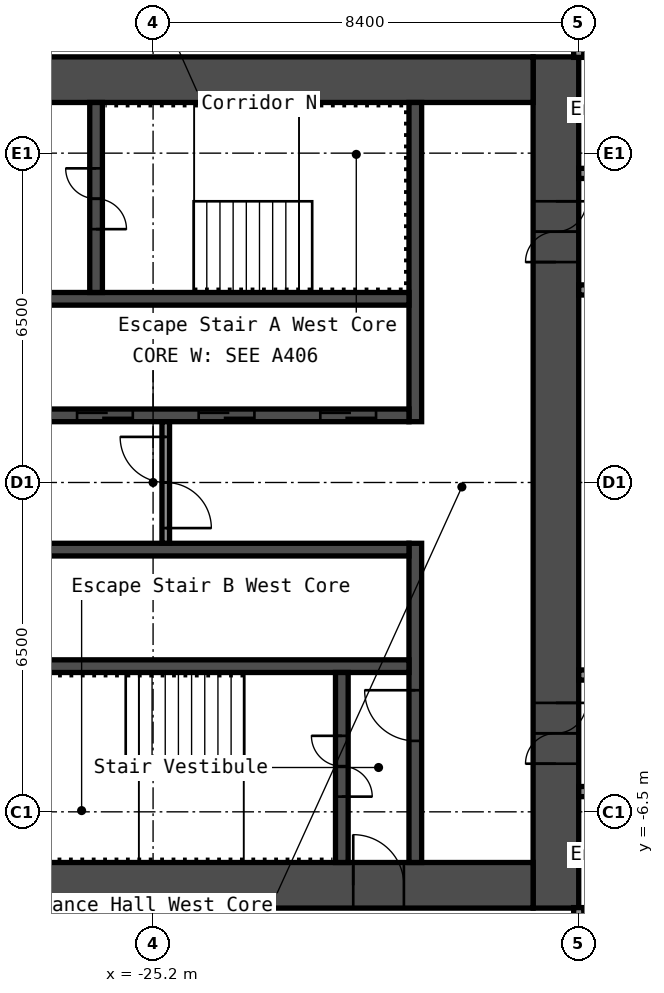
"""IFC4 building model, lengths in metres.
Left out: names, types, materials, properties, quantities, classifications, styles, units other than length and angle.
Written with IfcOpenShell. Run it as: python <this file> out.ifc"""

import sys

from ifc_helpers import new_model, si_unit, direction, frame, frame_2d, origin, place, context, subcontext, project, spatial, rectangle, extrude, element, fill, save


model = new_model("IFC4")
c1 = context("Model", 3, precision=1e-05, world=origin(), true_north=direction((0.0, 1.0)))
c2 = subcontext(c1, "Body", "Model", "MODEL_VIEW")
j1 = project(units=[si_unit("LENGTHUNIT", "METRE"), si_unit("PLANEANGLEUNIT", "RADIAN")], contexts=[c1])
p1 = place(None, origin())
s1 = spatial("IfcSite", under=j1, at=p1, CompositionType="ELEMENT")
p2 = place(p1, origin())
s2 = spatial("IfcBuilding", under=s1, at=p2, CompositionType="ELEMENT")
p3 = place(p2, frame((0.0, 0.0, 42.2)))
s3 = spatial("IfcBuildingStorey", under=s2, at=p3, CompositionType="ELEMENT", Elevation=42.2)
p4 = place(p3, frame((-17.25, -8.4, 0.0), z_axis=(0.0, 0.0, 1.0), x_axis=(0.0, 1.0, 0.0)))
e1 = element("IfcWall", 1, at=p4, inside=s3, PredefinedType="SHEAR", context=c2, shape_type="SweptSolid", body=[
    extrude(rectangle(XDim=16.8, YDim=0.9, at=frame_2d((8.4, 0.0))), origin(), (0.0, 0.0, 1.0), 2.8),
])
p5 = place(p4, frame((12.75, 0.0, 0.0)))
e2 = element("IfcOpeningElement", 2, at=p5, cuts=e1, PredefinedType="OPENING", context=c2, shape_type="SweptSolid", body=[
    extrude(rectangle(XDim=1.2, YDim=2.1, at=frame_2d((0.6, 1.05))), frame((0.0, 0.46, 0.0), z_axis=(0.0, -1.0, 0.0), x_axis=(1.0, 0.0, 0.0)), (0.0, 0.0, 1.0), 0.92),
])
p6 = place(p4, frame((2.85, 0.0, 0.0)))
e3 = element("IfcOpeningElement", 3, at=p6, cuts=e1, PredefinedType="OPENING", context=c2, shape_type="SweptSolid", body=[
    extrude(rectangle(XDim=1.2, YDim=2.1, at=frame_2d((0.6, 1.05))), frame((0.0, 0.46, 0.0), z_axis=(0.0, -1.0, 0.0), x_axis=(1.0, 0.0, 0.0)), (0.0, 0.0, 1.0), 0.92),
])
p7 = place(p3, frame((-32.7, 7.95, 0.0), z_axis=(0.0, 0.0, 1.0), x_axis=(1.0, 0.0, 0.0)))
e4 = element("IfcWall", 4, at=p7, inside=s3, PredefinedType="SHEAR", context=c2, shape_type="SweptSolid", body=[
    extrude(rectangle(XDim=15.0, YDim=0.9, at=frame_2d((7.5, 0.0))), origin(), (0.0, 0.0, 1.0), 2.8),
])
p8 = place(p7, frame((3.4, 0.0, 0.0)))
e5 = element("IfcOpeningElement", 5, at=p8, cuts=e4, PredefinedType="OPENING", context=c2, shape_type="SweptSolid", body=[
    extrude(rectangle(XDim=1.2, YDim=2.1, at=frame_2d((0.6, 1.05))), frame((0.0, 0.46, 0.0), z_axis=(0.0, -1.0, 0.0), x_axis=(1.0, 0.0, 0.0)), (0.0, 0.0, 1.0), 0.92),
])
p9 = place(p7, frame((0.75, 0.0, 0.0)))
e6 = element("IfcOpeningElement", 6, at=p9, cuts=e4, PredefinedType="OPENING", context=c2, shape_type="SweptSolid", body=[
    extrude(rectangle(XDim=0.9, YDim=2.1, at=frame_2d((0.45, 1.05))), frame((0.0, 0.46, 0.0), z_axis=(0.0, -1.0, 0.0), x_axis=(1.0, 0.0, 0.0)), (0.0, 0.0, 1.0), 0.92),
])
p10 = place(p3, frame((-32.7, -7.95, 0.0), z_axis=(0.0, 0.0, 1.0), x_axis=(1.0, 0.0, 0.0)))
e7 = element("IfcWall", 7, at=p10, inside=s3, PredefinedType="SHEAR", context=c2, shape_type="SweptSolid", body=[
    extrude(rectangle(XDim=15.0, YDim=0.9, at=frame_2d((7.5, 0.0))), origin(), (0.0, 0.0, 1.0), 2.8),
])
p11 = place(p10, frame((11.45, 0.0, 0.0)))
e8 = element("IfcOpeningElement", 8, at=p11, cuts=e7, PredefinedType="OPENING", context=c2, shape_type="SweptSolid", body=[
    extrude(rectangle(XDim=1.0, YDim=2.1, at=frame_2d((0.5, 1.05))), frame((0.0, 0.46, 0.0), z_axis=(0.0, -1.0, 0.0), x_axis=(1.0, 0.0, 0.0)), (0.0, 0.0, 1.0), 0.92),
])
p12 = place(p3, frame((-20.025, 1.2, 0.0), z_axis=(0.0, 0.0, 1.0), x_axis=(0.0, 1.0, 0.0)))
e9 = element("IfcWall", 9, at=p12, inside=s3, PredefinedType="SHEAR", context=c2, shape_type="SweptSolid", body=[
    extrude(rectangle(XDim=6.3, YDim=0.25, at=frame_2d((3.15, 0.0))), origin(), (0.0, 0.0, 1.0), 2.8),
])
p13 = place(p3, frame((-20.025, -7.5, 0.0), z_axis=(0.0, 0.0, 1.0), x_axis=(0.0, 1.0, 0.0)))
e10 = element("IfcWall", 10, at=p13, inside=s3, PredefinedType="SHEAR", context=c2, shape_type="SweptSolid", body=[
    extrude(rectangle(XDim=6.3, YDim=0.25, at=frame_2d((3.15, 0.0))), origin(), (0.0, 0.0, 1.0), 2.8),
])
p14 = place(p13, frame((2.4, 0.0, 0.0)))
e11 = element("IfcOpeningElement", 11, at=p14, cuts=e10, PredefinedType="OPENING", context=c2, shape_type="SweptSolid", body=[
    extrude(rectangle(XDim=1.0, YDim=2.1, at=frame_2d((0.5, 1.05))), frame((0.0, 0.135, 0.0), z_axis=(0.0, -1.0, 0.0), x_axis=(1.0, 0.0, 0.0)), (0.0, 0.0, 1.0), 0.27),
])
p15 = place(p3, frame((-27.65, 1.325, 0.0), z_axis=(0.0, 0.0, 1.0), x_axis=(1.0, 0.0, 0.0)))
e12 = element("IfcWall", 12, at=p15, inside=s3, PredefinedType="SHEAR", context=c2, shape_type="SweptSolid", body=[
    extrude(rectangle(XDim=7.5, YDim=0.25, at=frame_2d((3.75, 0.0))), origin(), (0.0, 0.0, 1.0), 2.8),
])
p16 = place(p15, frame((5.75, 0.0, 0.0)))
e13 = element("IfcOpeningElement", 13, at=p16, cuts=e12, PredefinedType="OPENING", context=c2, shape_type="SweptSolid", body=[
    extrude(rectangle(XDim=1.1, YDim=2.1, at=frame_2d((0.55, 1.05))), frame((0.0, 0.135, 0.0), z_axis=(0.0, -1.0, 0.0), x_axis=(1.0, 0.0, 0.0)), (0.0, 0.0, 1.0), 0.27),
])
p17 = place(p15, frame((3.35, 0.0, 0.0)))
e14 = element("IfcOpeningElement", 14, at=p17, cuts=e12, PredefinedType="OPENING", context=c2, shape_type="SweptSolid", body=[
    extrude(rectangle(XDim=1.1, YDim=2.1, at=frame_2d((0.55, 1.05))), frame((0.0, 0.135, 0.0), z_axis=(0.0, -1.0, 0.0), x_axis=(1.0, 0.0, 0.0)), (0.0, 0.0, 1.0), 0.27),
])
p18 = place(p15, frame((0.95, 0.0, 0.0)))
e15 = element("IfcOpeningElement", 15, at=p18, cuts=e12, PredefinedType="OPENING", context=c2, shape_type="SweptSolid", body=[
    extrude(rectangle(XDim=1.1, YDim=2.1, at=frame_2d((0.55, 1.05))), frame((0.0, 0.135, 0.0), z_axis=(0.0, -1.0, 0.0), x_axis=(1.0, 0.0, 0.0)), (0.0, 0.0, 1.0), 0.27),
])
p19 = place(p3, frame((-27.65, 3.625, 0.0), z_axis=(0.0, 0.0, 1.0), x_axis=(1.0, 0.0, 0.0)))
e16 = element("IfcWall", 16, at=p19, inside=s3, PredefinedType="SHEAR", context=c2, shape_type="SweptSolid", body=[
    extrude(rectangle(XDim=7.5, YDim=0.25, at=frame_2d((3.75, 0.0))), origin(), (0.0, 0.0, 1.0), 2.8),
])
p20 = place(p3, frame((-26.325, 3.75, 0.0), z_axis=(0.0, 0.0, 1.0), x_axis=(0.0, 1.0, 0.0)))
e17 = element("IfcWall", 17, at=p20, inside=s3, PredefinedType="SHEAR", context=c2, shape_type="SweptSolid", body=[
    extrude(rectangle(XDim=3.75, YDim=0.25, at=frame_2d((1.875, 0.0))), origin(), (0.0, 0.0, 1.0), 2.8),
])
p21 = place(p20, frame((1.25, 0.0, 0.0)))
e18 = element("IfcOpeningElement", 18, at=p21, cuts=e17, PredefinedType="OPENING", context=c2, shape_type="SweptSolid", body=[
    extrude(rectangle(XDim=1.2, YDim=2.1, at=frame_2d((0.6, 1.05))), frame((0.0, 0.135, 0.0), z_axis=(0.0, -1.0, 0.0), x_axis=(1.0, 0.0, 0.0)), (0.0, 0.0, 1.0), 0.27),
])
for number, where, z_axis, x_axis in (
    (19, (-27.65, -1.325, 0.0), (0.0, 0.0, 1.0), (1.0, 0.0, 0.0)),
    (20, (-27.65, -3.625, 0.0), (0.0, 0.0, 1.0), (1.0, 0.0, 0.0)),
):
    element("IfcWall", number, at=place(p3, frame(where, z_axis=z_axis, x_axis=x_axis)), inside=s3, PredefinedType="SHEAR", context=c2, shape_type="SweptSolid", body=[
        extrude(rectangle(XDim=7.5, YDim=0.25, at=frame_2d((3.75, 0.0))), origin(), (0.0, 0.0, 1.0), 2.8),
    ])
p22 = place(p3, frame((-21.475, -7.5, 0.0), z_axis=(0.0, 0.0, 1.0), x_axis=(0.0, 1.0, 0.0)))
e21 = element("IfcWall", 21, at=p22, inside=s3, PredefinedType="SHEAR", context=c2, shape_type="SweptSolid", body=[
    extrude(rectangle(XDim=3.75, YDim=0.25, at=frame_2d((1.875, 0.0))), origin(), (0.0, 0.0, 1.0), 2.8),
])
p23 = place(p22, frame((1.3, 0.0, 0.0)))
e22 = element("IfcOpeningElement", 22, at=p23, cuts=e21, PredefinedType="OPENING", context=c2, shape_type="SweptSolid", body=[
    extrude(rectangle(XDim=1.2, YDim=2.1, at=frame_2d((0.6, 1.05))), frame((0.0, 0.135, 0.0), z_axis=(0.0, -1.0, 0.0), x_axis=(1.0, 0.0, 0.0)), (0.0, 0.0, 1.0), 0.27),
])
p24 = place(p3, frame((-24.95, -1.2, 0.0), z_axis=(0.0, 0.0, 1.0), x_axis=(0.0, 1.0, 0.0)))
e23 = element("IfcWall", 23, at=p24, inside=s3, PredefinedType="PARTITIONING", context=c2, shape_type="SweptSolid", body=[
    extrude(rectangle(XDim=2.4, YDim=0.15, at=frame_2d((1.2, 0.0))), origin(), (0.0, 0.0, 1.0), 2.8),
])
p25 = place(p24, frame((0.3, 0.0, 0.0)))
e24 = element("IfcOpeningElement", 24, at=p25, cuts=e23, PredefinedType="OPENING", context=c2, shape_type="SweptSolid", body=[
    extrude(rectangle(XDim=1.8, YDim=2.1, at=frame_2d((0.9, 1.05))), frame((0.0, 0.085, 0.0), z_axis=(0.0, -1.0, 0.0), x_axis=(1.0, 0.0, 0.0)), (0.0, 0.0, 1.0), 0.17),
])
p26 = place(p3, frame((-16.8, -6.1, 0.0), z_axis=(0.0, 0.0, 1.0), x_axis=(1.0, 0.0, 0.0)))
e25 = element("IfcWall", 25, at=p26, inside=s3, PredefinedType="PARTITIONING", context=c2, shape_type="SweptSolid", body=[
    extrude(rectangle(XDim=33.6, YDim=0.2, at=frame_2d((16.8, 0.0))), origin(), (0.0, 0.0, 1.0), 2.8),
])
p27 = place(p26, frame((5.4, 0.0, 0.0)))
e26 = element("IfcOpeningElement", 26, at=p27, cuts=e25, PredefinedType="OPENING", context=c2, shape_type="SweptSolid", body=[
    extrude(rectangle(XDim=1.0, YDim=2.1, at=frame_2d((0.5, 1.05))), frame((0.0, 0.11, 0.0), z_axis=(0.0, -1.0, 0.0), x_axis=(1.0, 0.0, 0.0)), (0.0, 0.0, 1.0), 0.22),
])
p28 = place(p26, frame((11.25, 0.0, 0.0)))
e27 = element("IfcOpeningElement", 27, at=p28, cuts=e25, PredefinedType="OPENING", context=c2, shape_type="SweptSolid", body=[
    extrude(rectangle(XDim=1.0, YDim=2.1, at=frame_2d((0.5, 1.05))), frame((0.0, 0.11, 0.0), z_axis=(0.0, -1.0, 0.0), x_axis=(1.0, 0.0, 0.0)), (0.0, 0.0, 1.0), 0.22),
])
p29 = place(p26, frame((12.95, 0.0, 0.0)))
e28 = element("IfcOpeningElement", 28, at=p29, cuts=e25, PredefinedType="OPENING", context=c2, shape_type="SweptSolid", body=[
    extrude(rectangle(XDim=1.0, YDim=2.1, at=frame_2d((0.5, 1.05))), frame((0.0, 0.11, 0.0), z_axis=(0.0, -1.0, 0.0), x_axis=(1.0, 0.0, 0.0)), (0.0, 0.0, 1.0), 0.22),
])
p30 = place(p26, frame((18.115, 0.0, 0.0)))
e29 = element("IfcOpeningElement", 29, at=p30, cuts=e25, PredefinedType="OPENING", context=c2, shape_type="SweptSolid", body=[
    extrude(rectangle(XDim=0.9, YDim=2.1, at=frame_2d((0.45, 1.05))), frame((0.0, 0.11, 0.0), z_axis=(0.0, -1.0, 0.0), x_axis=(1.0, 0.0, 0.0)), (0.0, 0.0, 1.0), 0.22),
])
p31 = place(p26, frame((22.315, 0.0, 0.0)))
e30 = element("IfcOpeningElement", 30, at=p31, cuts=e25, PredefinedType="OPENING", context=c2, shape_type="SweptSolid", body=[
    extrude(rectangle(XDim=0.9, YDim=2.1, at=frame_2d((0.45, 1.05))), frame((0.0, 0.11, 0.0), z_axis=(0.0, -1.0, 0.0), x_axis=(1.0, 0.0, 0.0)), (0.0, 0.0, 1.0), 0.22),
])
p32 = place(p26, frame((28.05, 0.0, 0.0)))
e31 = element("IfcOpeningElement", 31, at=p32, cuts=e25, PredefinedType="OPENING", context=c2, shape_type="SweptSolid", body=[
    extrude(rectangle(XDim=1.0, YDim=2.1, at=frame_2d((0.5, 1.05))), frame((0.0, 0.11, 0.0), z_axis=(0.0, -1.0, 0.0), x_axis=(1.0, 0.0, 0.0)), (0.0, 0.0, 1.0), 0.22),
])
p33 = place(p26, frame((29.75, 0.0, 0.0)))
e32 = element("IfcOpeningElement", 32, at=p33, cuts=e25, PredefinedType="OPENING", context=c2, shape_type="SweptSolid", body=[
    extrude(rectangle(XDim=1.0, YDim=2.1, at=frame_2d((0.5, 1.05))), frame((0.0, 0.11, 0.0), z_axis=(0.0, -1.0, 0.0), x_axis=(1.0, 0.0, 0.0)), (0.0, 0.0, 1.0), 0.22),
])
p34 = place(p3, frame((-16.8, -3.8, 0.0), z_axis=(0.0, 0.0, 1.0), x_axis=(1.0, 0.0, 0.0)))
e33 = element("IfcWall", 33, at=p34, inside=s3, PredefinedType="PARTITIONING", context=c2, shape_type="SweptSolid", body=[
    extrude(rectangle(XDim=33.6, YDim=0.2, at=frame_2d((16.8, 0.0))), origin(), (0.0, 0.0, 1.0), 2.8),
])
p35 = place(p34, frame((9.46, 0.0, 0.0)))
e34 = element("IfcOpeningElement", 34, at=p35, cuts=e33, PredefinedType="OPENING", context=c2, shape_type="SweptSolid", body=[
    extrude(rectangle(XDim=0.9, YDim=2.1, at=frame_2d((0.45, 1.05))), frame((0.0, 0.11, 0.0), z_axis=(0.0, -1.0, 0.0), x_axis=(1.0, 0.0, 0.0)), (0.0, 0.0, 1.0), 0.22),
])
p36 = place(p34, frame((13.66, 0.0, 0.0)))
e35 = element("IfcOpeningElement", 35, at=p36, cuts=e33, PredefinedType="OPENING", context=c2, shape_type="SweptSolid", body=[
    extrude(rectangle(XDim=0.9, YDim=2.1, at=frame_2d((0.45, 1.05))), frame((0.0, 0.11, 0.0), z_axis=(0.0, -1.0, 0.0), x_axis=(1.0, 0.0, 0.0)), (0.0, 0.0, 1.0), 0.22),
])
p37 = place(p34, frame((26.6, 0.0, 0.0)))
e36 = element("IfcOpeningElement", 36, at=p37, cuts=e33, PredefinedType="OPENING", context=c2, shape_type="SweptSolid", body=[
    extrude(rectangle(XDim=0.9, YDim=2.1, at=frame_2d((0.45, 1.05))), frame((0.0, 0.11, 0.0), z_axis=(0.0, -1.0, 0.0), x_axis=(1.0, 0.0, 0.0)), (0.0, 0.0, 1.0), 0.22),
])
p38 = place(p34, frame((30.8, 0.0, 0.0)))
e37 = element("IfcOpeningElement", 37, at=p38, cuts=e33, PredefinedType="OPENING", context=c2, shape_type="SweptSolid", body=[
    extrude(rectangle(XDim=0.9, YDim=2.1, at=frame_2d((0.45, 1.05))), frame((0.0, 0.11, 0.0), z_axis=(0.0, -1.0, 0.0), x_axis=(1.0, 0.0, 0.0)), (0.0, 0.0, 1.0), 0.22),
])
p39 = place(p3, frame((-16.8, 3.8, 0.0), z_axis=(0.0, 0.0, 1.0), x_axis=(1.0, 0.0, 0.0)))
e38 = element("IfcWall", 38, at=p39, inside=s3, PredefinedType="PARTITIONING", context=c2, shape_type="SweptSolid", body=[
    extrude(rectangle(XDim=33.6, YDim=0.2, at=frame_2d((16.8, 0.0))), origin(), (0.0, 0.0, 1.0), 2.8),
])
p40 = place(p39, frame((2.24, 0.0, 0.0)))
e39 = element("IfcOpeningElement", 39, at=p40, cuts=e38, PredefinedType="OPENING", context=c2, shape_type="SweptSolid", body=[
    extrude(rectangle(XDim=0.9, YDim=2.1, at=frame_2d((0.45, 1.05))), frame((0.0, 0.11, 0.0), z_axis=(0.0, -1.0, 0.0), x_axis=(1.0, 0.0, 0.0)), (0.0, 0.0, 1.0), 0.22),
])
p41 = place(p39, frame((6.44, 0.0, 0.0)))
e40 = element("IfcOpeningElement", 40, at=p41, cuts=e38, PredefinedType="OPENING", context=c2, shape_type="SweptSolid", body=[
    extrude(rectangle(XDim=0.9, YDim=2.1, at=frame_2d((0.45, 1.05))), frame((0.0, 0.11, 0.0), z_axis=(0.0, -1.0, 0.0), x_axis=(1.0, 0.0, 0.0)), (0.0, 0.0, 1.0), 0.22),
])
p42 = place(p39, frame((17.945, 0.0, 0.0)))
e41 = element("IfcOpeningElement", 41, at=p42, cuts=e38, PredefinedType="OPENING", context=c2, shape_type="SweptSolid", body=[
    extrude(rectangle(XDim=0.9, YDim=2.1, at=frame_2d((0.45, 1.05))), frame((0.0, 0.11, 0.0), z_axis=(0.0, -1.0, 0.0), x_axis=(1.0, 0.0, 0.0)), (0.0, 0.0, 1.0), 0.22),
])
p43 = place(p39, frame((22.145, 0.0, 0.0)))
e42 = element("IfcOpeningElement", 42, at=p43, cuts=e38, PredefinedType="OPENING", context=c2, shape_type="SweptSolid", body=[
    extrude(rectangle(XDim=0.9, YDim=2.1, at=frame_2d((0.45, 1.05))), frame((0.0, 0.11, 0.0), z_axis=(0.0, -1.0, 0.0), x_axis=(1.0, 0.0, 0.0)), (0.0, 0.0, 1.0), 0.22),
])
p44 = place(p3, frame((-16.8, 6.1, 0.0), z_axis=(0.0, 0.0, 1.0), x_axis=(1.0, 0.0, 0.0)))
e43 = element("IfcWall", 43, at=p44, inside=s3, PredefinedType="PARTITIONING", context=c2, shape_type="SweptSolid", body=[
    extrude(rectangle(XDim=33.6, YDim=0.2, at=frame_2d((16.8, 0.0))), origin(), (0.0, 0.0, 1.0), 2.8),
])
p45 = place(p44, frame((5.4, 0.0, 0.0)))
e44 = element("IfcOpeningElement", 44, at=p45, cuts=e43, PredefinedType="OPENING", context=c2, shape_type="SweptSolid", body=[
    extrude(rectangle(XDim=1.0, YDim=2.1, at=frame_2d((0.5, 1.05))), frame((0.0, 0.11, 0.0), z_axis=(0.0, -1.0, 0.0), x_axis=(1.0, 0.0, 0.0)), (0.0, 0.0, 1.0), 0.22),
])
p46 = place(p44, frame((11.25, 0.0, 0.0)))
e45 = element("IfcOpeningElement", 45, at=p46, cuts=e43, PredefinedType="OPENING", context=c2, shape_type="SweptSolid", body=[
    extrude(rectangle(XDim=1.0, YDim=2.1, at=frame_2d((0.5, 1.05))), frame((0.0, 0.11, 0.0), z_axis=(0.0, -1.0, 0.0), x_axis=(1.0, 0.0, 0.0)), (0.0, 0.0, 1.0), 0.22),
])
p47 = place(p44, frame((12.95, 0.0, 0.0)))
e46 = element("IfcOpeningElement", 46, at=p47, cuts=e43, PredefinedType="OPENING", context=c2, shape_type="SweptSolid", body=[
    extrude(rectangle(XDim=1.0, YDim=2.1, at=frame_2d((0.5, 1.05))), frame((0.0, 0.11, 0.0), z_axis=(0.0, -1.0, 0.0), x_axis=(1.0, 0.0, 0.0)), (0.0, 0.0, 1.0), 0.22),
])
p48 = place(p44, frame((18.28, 0.0, 0.0)))
e47 = element("IfcOpeningElement", 47, at=p48, cuts=e43, PredefinedType="OPENING", context=c2, shape_type="SweptSolid", body=[
    extrude(rectangle(XDim=0.9, YDim=2.1, at=frame_2d((0.45, 1.05))), frame((0.0, 0.11, 0.0), z_axis=(0.0, -1.0, 0.0), x_axis=(1.0, 0.0, 0.0)), (0.0, 0.0, 1.0), 0.22),
])
p49 = place(p44, frame((22.48, 0.0, 0.0)))
e48 = element("IfcOpeningElement", 48, at=p49, cuts=e43, PredefinedType="OPENING", context=c2, shape_type="SweptSolid", body=[
    extrude(rectangle(XDim=0.9, YDim=2.1, at=frame_2d((0.45, 1.05))), frame((0.0, 0.11, 0.0), z_axis=(0.0, -1.0, 0.0), x_axis=(1.0, 0.0, 0.0)), (0.0, 0.0, 1.0), 0.22),
])
p50 = place(p44, frame((28.05, 0.0, 0.0)))
e49 = element("IfcOpeningElement", 49, at=p50, cuts=e43, PredefinedType="OPENING", context=c2, shape_type="SweptSolid", body=[
    extrude(rectangle(XDim=1.0, YDim=2.1, at=frame_2d((0.5, 1.05))), frame((0.0, 0.11, 0.0), z_axis=(0.0, -1.0, 0.0), x_axis=(1.0, 0.0, 0.0)), (0.0, 0.0, 1.0), 0.22),
])
p51 = place(p44, frame((29.75, 0.0, 0.0)))
e50 = element("IfcOpeningElement", 50, at=p51, cuts=e43, PredefinedType="OPENING", context=c2, shape_type="SweptSolid", body=[
    extrude(rectangle(XDim=1.0, YDim=2.1, at=frame_2d((0.5, 1.05))), frame((0.0, 0.11, 0.0), z_axis=(0.0, -1.0, 0.0), x_axis=(1.0, 0.0, 0.0)), (0.0, 0.0, 1.0), 0.22),
])
for number, where, z_axis, x_axis in (
    (51, (-16.8, -20.3, 0.0), (0.0, 0.0, 1.0), (0.0, 1.0, 0.0)),
    (52, (-16.8, 8.39, 0.0), (0.0, 0.0, 1.0), (0.0, 1.0, 0.0)),
):
    element("IfcWall", number, at=place(p3, frame(where, z_axis=z_axis, x_axis=x_axis)), inside=s3, PredefinedType="PARTITIONING", context=c2, shape_type="SweptSolid", body=[
        extrude(rectangle(XDim=11.91, YDim=0.2, at=frame_2d((5.955, 0.0))), origin(), (0.0, 0.0, 1.0), 2.8),
    ])
p52 = place(p5, origin())
e53 = element("IfcDoor", 53, at=p52, inside=s3, OperationType="DOUBLE_DOOR_SINGLE_SWING", PredefinedType="DOOR", context=c2, shape_type="SweptSolid", body=[
    extrude(rectangle(XDim=1.2, YDim=2.1, at=frame_2d((0.6, 1.05))), frame((0.0, 0.025, 0.0), z_axis=(0.0, -1.0, 0.0), x_axis=(1.0, 0.0, 0.0)), (0.0, 0.0, 1.0), 0.05),
])
fill(e2, e53)
p53 = place(p6, origin())
e54 = element("IfcDoor", 54, at=p53, inside=s3, OperationType="DOUBLE_DOOR_SINGLE_SWING", PredefinedType="DOOR", context=c2, shape_type="SweptSolid", body=[
    extrude(rectangle(XDim=1.2, YDim=2.1, at=frame_2d((0.6, 1.05))), frame((0.0, 0.025, 0.0), z_axis=(0.0, -1.0, 0.0), x_axis=(1.0, 0.0, 0.0)), (0.0, 0.0, 1.0), 0.05),
])
fill(e3, e54)
p54 = place(p11, origin())
e55 = element("IfcDoor", 55, at=p54, inside=s3, OperationType="SINGLE_SWING_RIGHT", PredefinedType="DOOR", context=c2, shape_type="SweptSolid", body=[
    extrude(rectangle(XDim=1.0, YDim=2.1, at=frame_2d((0.5, 1.05))), frame((0.0, 0.025, 0.0), z_axis=(0.0, -1.0, 0.0), x_axis=(1.0, 0.0, 0.0)), (0.0, 0.0, 1.0), 0.05),
])
fill(e8, e55)
p55 = place(p21, origin())
e56 = element("IfcDoor", 56, at=p55, inside=s3, OperationType="DOUBLE_DOOR_SINGLE_SWING", PredefinedType="DOOR", context=c2, shape_type="SweptSolid", body=[
    extrude(rectangle(XDim=1.2, YDim=2.1, at=frame_2d((0.6, 1.05))), frame((0.0, 0.025, 0.0), z_axis=(0.0, -1.0, 0.0), x_axis=(1.0, 0.0, 0.0)), (0.0, 0.0, 1.0), 0.05),
])
fill(e18, e56)
p56 = place(p23, origin())
e57 = element("IfcDoor", 57, at=p56, inside=s3, OperationType="DOUBLE_DOOR_SINGLE_SWING", PredefinedType="DOOR", context=c2, shape_type="SweptSolid", body=[
    extrude(rectangle(XDim=1.2, YDim=2.1, at=frame_2d((0.6, 1.05))), frame((0.0, 0.025, 0.0), z_axis=(0.0, -1.0, 0.0), x_axis=(1.0, 0.0, 0.0)), (0.0, 0.0, 1.0), 0.05),
])
fill(e22, e57)
p57 = place(p14, origin())
e58 = element("IfcDoor", 58, at=p57, inside=s3, OperationType="SINGLE_SWING_LEFT", PredefinedType="DOOR", context=c2, shape_type="SweptSolid", body=[
    extrude(rectangle(XDim=1.0, YDim=2.1, at=frame_2d((0.5, 1.05))), frame((0.0, 0.025, 0.0), z_axis=(0.0, -1.0, 0.0), x_axis=(1.0, 0.0, 0.0)), (0.0, 0.0, 1.0), 0.05),
])
fill(e11, e58)
p58 = place(p25, origin())
e59 = element("IfcDoor", 59, at=p58, inside=s3, OperationType="DOUBLE_DOOR_SINGLE_SWING", PredefinedType="DOOR", context=c2, shape_type="SweptSolid", body=[
    extrude(rectangle(XDim=1.8, YDim=2.1, at=frame_2d((0.9, 1.05))), frame((0.0, 0.025, 0.0), z_axis=(0.0, -1.0, 0.0), x_axis=(1.0, 0.0, 0.0)), (0.0, 0.0, 1.0), 0.05),
])
fill(e24, e59)
p59 = place(p16, origin())
e60 = element("IfcDoor", 60, at=p59, inside=s3, OperationType="DOUBLE_DOOR_SLIDING", PredefinedType="DOOR", context=c2, shape_type="SweptSolid", body=[
    extrude(rectangle(XDim=1.1, YDim=2.1, at=frame_2d((0.55, 1.05))), frame((0.0, 0.025, 0.0), z_axis=(0.0, -1.0, 0.0), x_axis=(1.0, 0.0, 0.0)), (0.0, 0.0, 1.0), 0.05),
])
fill(e13, e60)
p60 = place(p17, origin())
e61 = element("IfcDoor", 61, at=p60, inside=s3, OperationType="DOUBLE_DOOR_SLIDING", PredefinedType="DOOR", context=c2, shape_type="SweptSolid", body=[
    extrude(rectangle(XDim=1.1, YDim=2.1, at=frame_2d((0.55, 1.05))), frame((0.0, 0.025, 0.0), z_axis=(0.0, -1.0, 0.0), x_axis=(1.0, 0.0, 0.0)), (0.0, 0.0, 1.0), 0.05),
])
fill(e14, e61)
p61 = place(p18, origin())
e62 = element("IfcDoor", 62, at=p61, inside=s3, OperationType="DOUBLE_DOOR_SLIDING", PredefinedType="DOOR", context=c2, shape_type="SweptSolid", body=[
    extrude(rectangle(XDim=1.1, YDim=2.1, at=frame_2d((0.55, 1.05))), frame((0.0, 0.025, 0.0), z_axis=(0.0, -1.0, 0.0), x_axis=(1.0, 0.0, 0.0)), (0.0, 0.0, 1.0), 0.05),
])
fill(e15, e62)
save(model, sys.argv[1])
